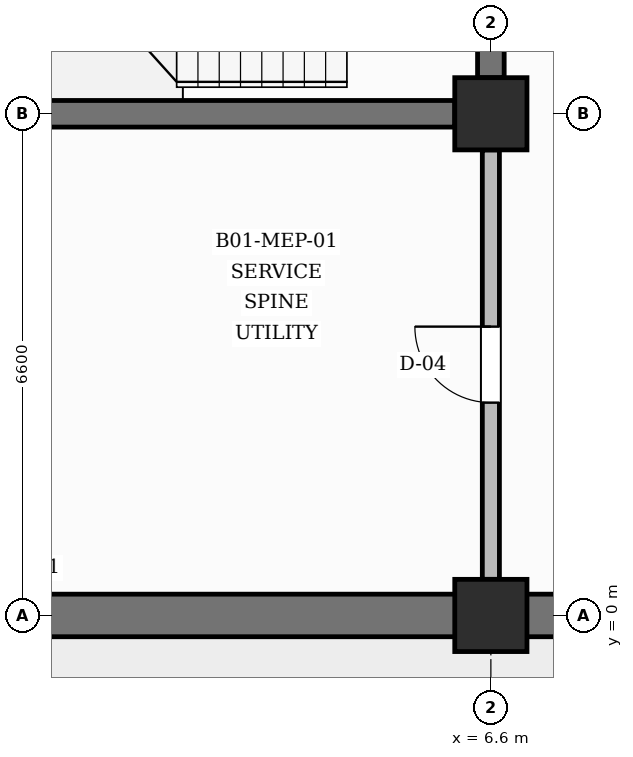
"""IFC4 building model, lengths in metres.
Left out: names, types, materials, properties, quantities, classifications, styles, units other than length and angle.
Written with IfcOpenShell. Run it as: python <this file> out.ifc"""

import sys

from ifc_helpers import new_model, si_unit, direction, frame, frame_2d, origin, origin_2d, place, context, subcontext, project, spatial, rectangle, extrude, element, fill, save


model = new_model("IFC4")
c1 = context("Model", 3, precision=1e-05, world=origin(), true_north=direction((0.0, 1.0)))
c2 = subcontext(c1, "Body", "Model", "MODEL_VIEW")
j1 = project(units=[si_unit("LENGTHUNIT", "METRE"), si_unit("PLANEANGLEUNIT", "RADIAN")], contexts=[c1])
p1 = place(None, origin())
s1 = spatial("IfcSite", under=j1, at=p1, CompositionType="ELEMENT")
p2 = place(p1, origin())
s2 = spatial("IfcBuilding", under=s1, at=p2, CompositionType="ELEMENT")
p3 = place(p2, frame((0.0, 0.0, -4.5)))
s3 = spatial("IfcBuildingStorey", under=s2, at=p3, CompositionType="ELEMENT", Elevation=-4.5)
for number, where, z_axis, x_axis in (
    (1, (6.6, 0.0, 0.0), (0.0, 0.0, 1.0), (1.0, 0.0, 0.0)),
    (2, (6.6, 6.6, 0.0), (0.0, 0.0, 1.0), (1.0, 0.0, 0.0)),
):
    element("IfcColumn", number, at=place(p3, frame(where, z_axis=z_axis, x_axis=x_axis)), inside=s3, PredefinedType="COLUMN", context=c2, shape_type="SweptSolid", body=[
        extrude(rectangle(XDim=0.95, YDim=0.95, at=origin_2d()), origin(), (0.0, 0.0, 1.0), 4.5),
    ])
p4 = place(p3, frame((0.475, 0.0, 0.0), z_axis=(0.0, 0.0, 1.0), x_axis=(1.0, 0.0, 0.0)))
e3 = element("IfcWall", 3, at=p4, inside=s3, PredefinedType="USERDEFINED", context=c2, shape_type="SweptSolid", body=[
    extrude(rectangle(XDim=5.65, YDim=0.56, at=frame_2d((2.825, 0.0))), origin(), (0.0, 0.0, 1.0), 3.49),
])
p5 = place(p3, frame((7.075, 0.0, 0.0), z_axis=(0.0, 0.0, 1.0), x_axis=(1.0, 0.0, 0.0)))
e4 = element("IfcWall", 4, at=p5, inside=s3, PredefinedType="USERDEFINED", context=c2, shape_type="SweptSolid", body=[
    extrude(rectangle(XDim=5.65, YDim=0.56, at=frame_2d((2.825, 0.0))), origin(), (0.0, 0.0, 1.0), 3.49),
])
p6 = place(p3, frame((0.475, 6.6, 0.0), z_axis=(0.0, 0.0, 1.0), x_axis=(1.0, 0.0, 0.0)))
e5 = element("IfcWall", 5, at=p6, inside=s3, PredefinedType="SHEAR", context=c2, shape_type="SweptSolid", body=[
    extrude(rectangle(XDim=5.65, YDim=0.35, at=frame_2d((2.825, 0.0))), origin(), (0.0, 0.0, 1.0), 3.34),
])
p7 = place(p3, frame((6.6, 7.075, 0.0), z_axis=(0.0, 0.0, 1.0), x_axis=(0.0, 1.0, 0.0)))
e6 = element("IfcWall", 6, at=p7, inside=s3, PredefinedType="SHEAR", context=c2, shape_type="SweptSolid", body=[
    extrude(rectangle(XDim=5.65, YDim=0.35, at=frame_2d((2.825, 0.0))), origin(), (0.0, 0.0, 1.0), 3.34),
])
p8 = place(p7, frame((2.275, 0.0, 0.0)))
e7 = element("IfcOpeningElement", 7, at=p8, cuts=e6, PredefinedType="OPENING", context=c2, shape_type="SweptSolid", body=[
    extrude(rectangle(XDim=1.1, YDim=2.15, at=frame_2d((0.55, 1.075))), frame((0.0, 0.185, 0.0), z_axis=(0.0, -1.0, 0.0), x_axis=(1.0, 0.0, 0.0)), (0.0, 0.0, 1.0), 0.37),
])
p9 = place(p3, frame((6.6, 0.475, 0.0), z_axis=(0.0, 0.0, 1.0), x_axis=(0.0, 1.0, 0.0)))
e8 = element("IfcWall", 8, at=p9, inside=s3, PredefinedType="PARTITIONING", context=c2, shape_type="SweptSolid", body=[
    extrude(rectangle(XDim=5.65, YDim=0.225, at=frame_2d((2.825, 0.0))), origin(), (0.0, 0.0, 1.0), 3.34),
])
p10 = place(p9, frame((2.325, 0.0, 0.0)))
e9 = element("IfcOpeningElement", 9, at=p10, cuts=e8, PredefinedType="OPENING", context=c2, shape_type="SweptSolid", body=[
    extrude(rectangle(XDim=1.0, YDim=2.1, at=frame_2d((0.5, 1.05))), frame((0.0, 0.123, 0.0), z_axis=(0.0, -1.0, 0.0), x_axis=(1.0, 0.0, 0.0)), (0.0, 0.0, 1.0), 0.245),
])
p11 = place(p10, origin())
e10 = element("IfcDoor", 10, at=p11, inside=s3, OperationType="SINGLE_SWING_RIGHT", PredefinedType="DOOR", context=c2, shape_type="SweptSolid", body=[
    extrude(rectangle(XDim=1.0, YDim=2.1, at=frame_2d((0.5, 1.05))), frame((0.0, 0.025, 0.0), z_axis=(0.0, -1.0, 0.0), x_axis=(1.0, 0.0, 0.0)), (0.0, 0.0, 1.0), 0.05),
])
fill(e9, e10)
save(model, sys.argv[1])
